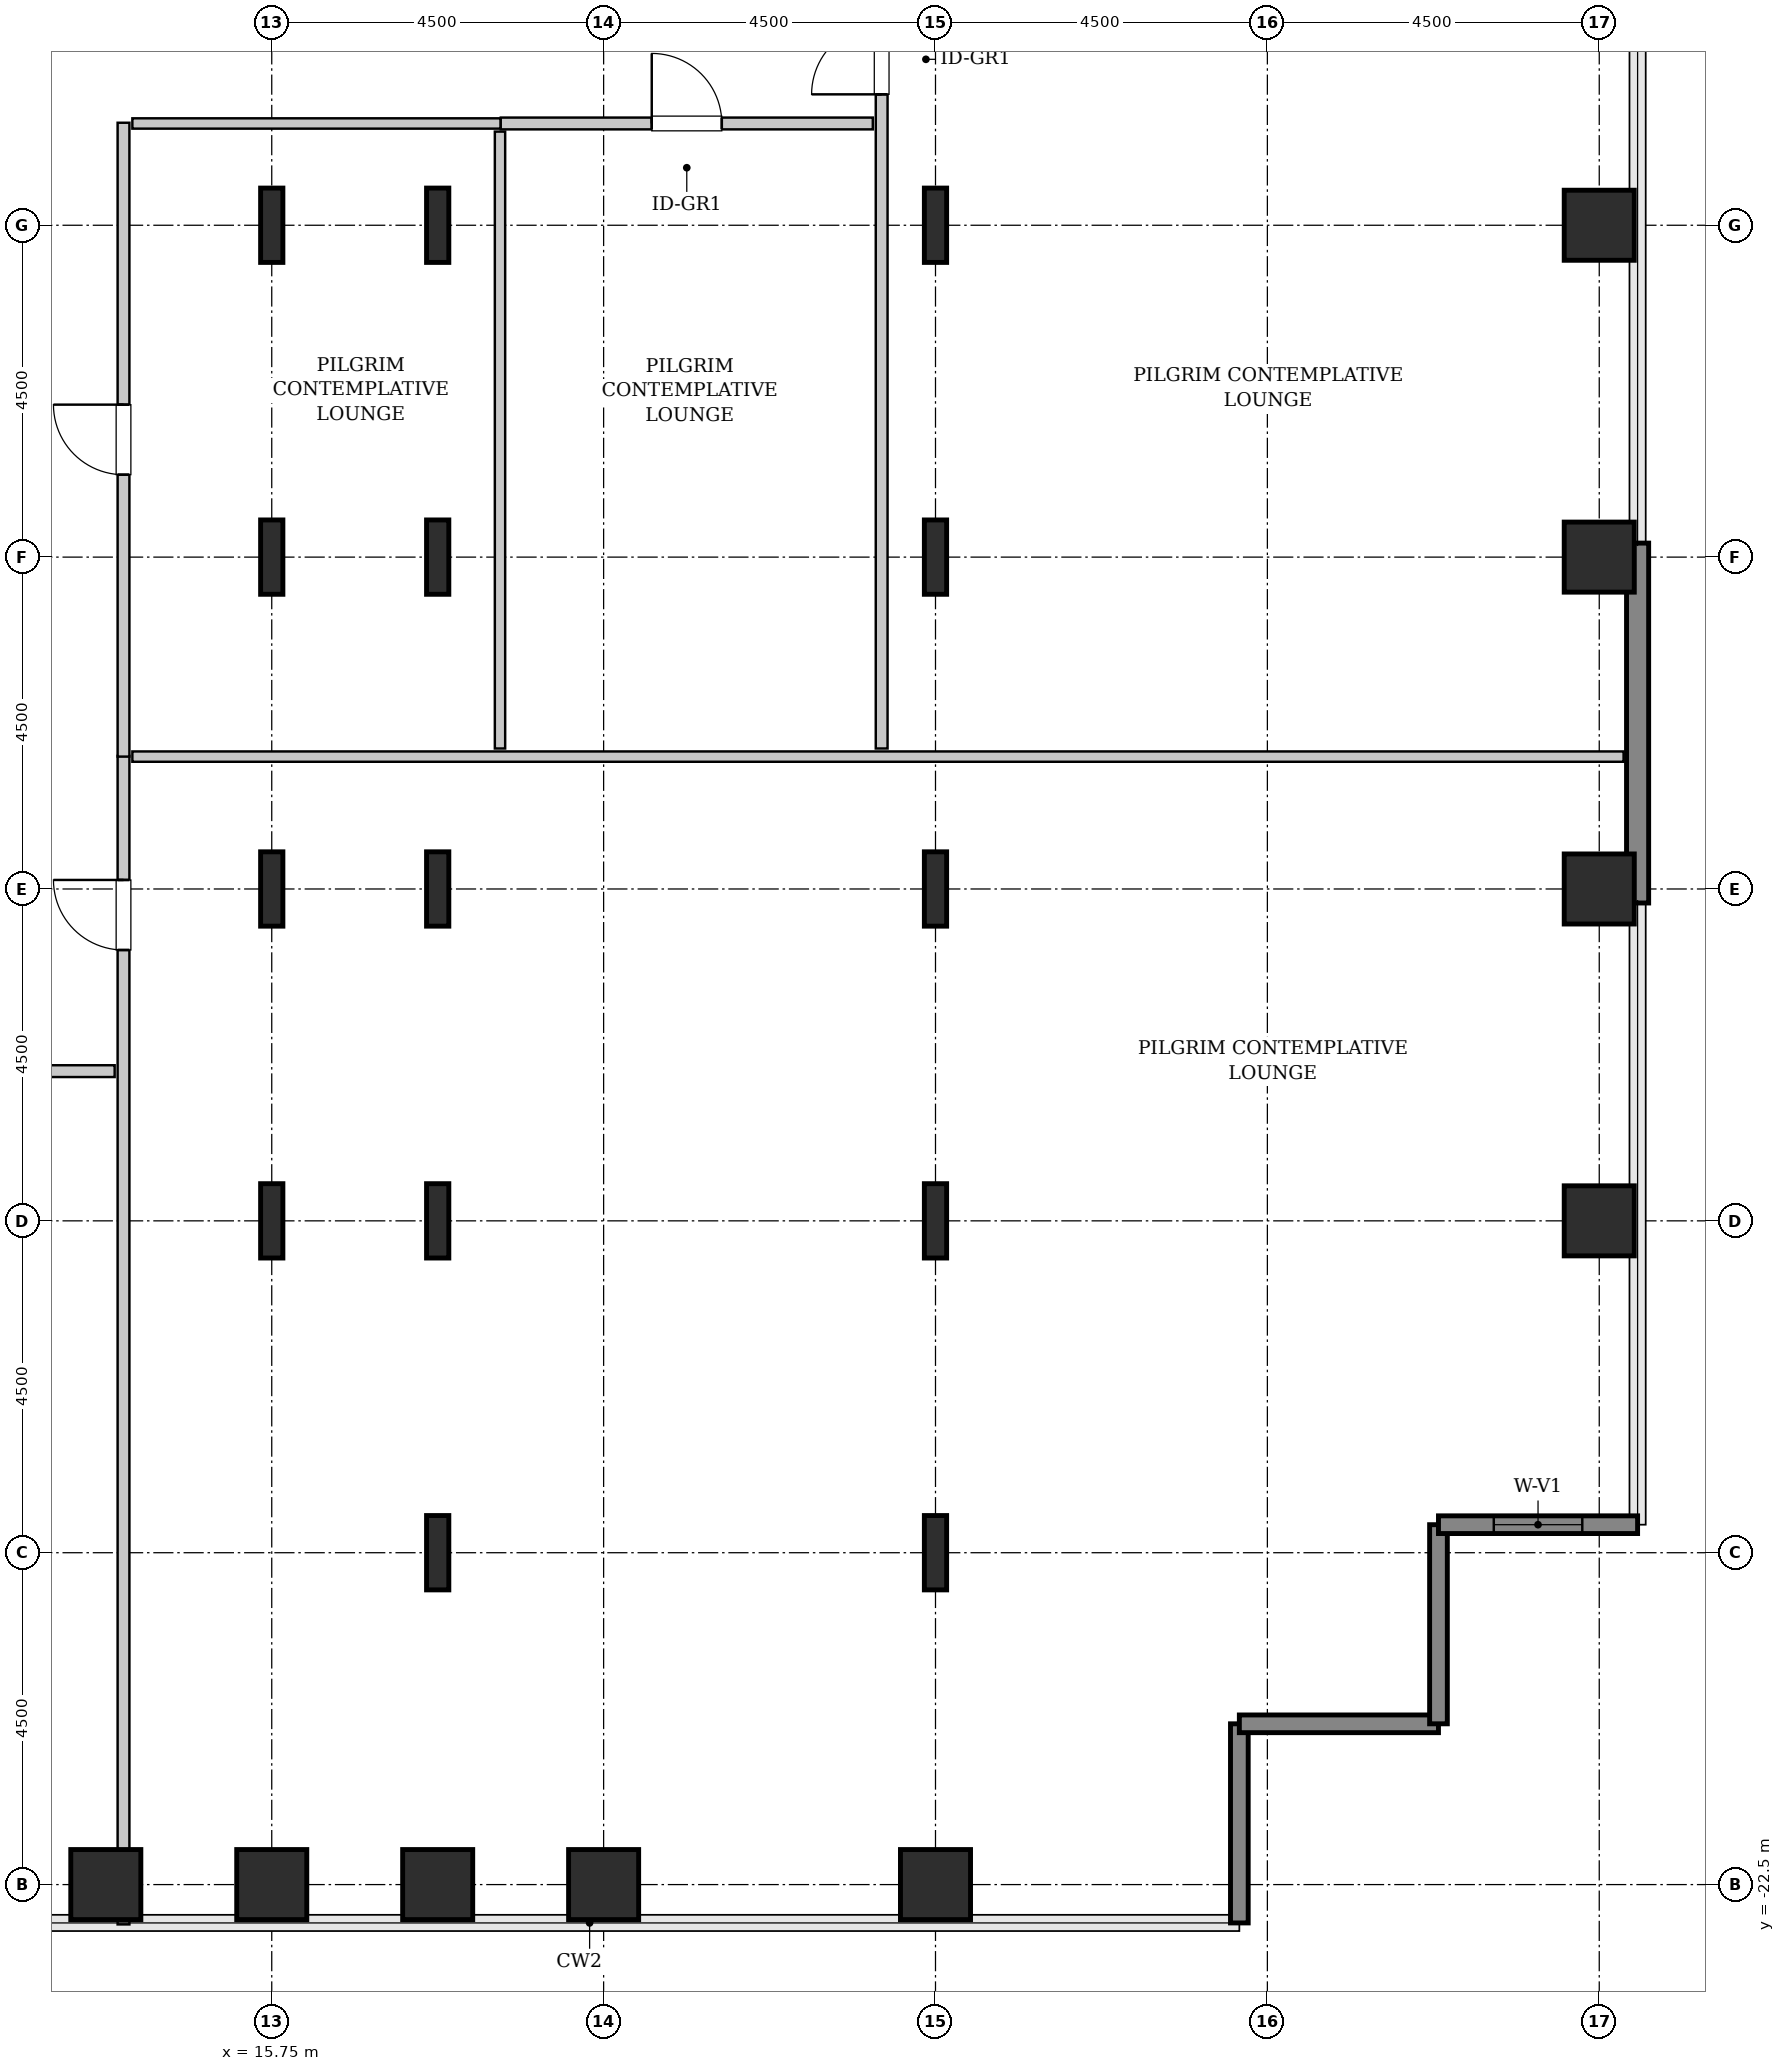
"""IFC4 building model, lengths in metres.
Left out: names, types, materials, properties, quantities, classifications, styles, units other than length and angle.
Written with IfcOpenShell. Run it as: python <this file> out.ifc"""

import sys

from ifc_helpers import new_model, si_unit, direction, frame, frame_2d, origin, origin_2d, place, context, subcontext, project, spatial, rectangle, hollow_rectangle, i_section, extrude, source, transform, mapped, element, fill, save


model = new_model("IFC4")
c1 = context("Model", 3, precision=1e-05, world=origin(), true_north=direction((0.0, 1.0)))
c2 = subcontext(c1, "Body", "Model", "MODEL_VIEW")
j1 = project(units=[si_unit("LENGTHUNIT", "METRE"), si_unit("PLANEANGLEUNIT", "RADIAN")], contexts=[c1])
p1 = place(None, origin())
s1 = spatial("IfcSite", under=j1, at=p1, CompositionType="ELEMENT")
p2 = place(p1, origin())
s2 = spatial("IfcBuilding", under=s1, at=p2, CompositionType="ELEMENT")
p3 = place(p2, frame((0.0, 0.0, 44.4)))
s3 = spatial("IfcBuildingStorey", under=s2, at=p3, CompositionType="ELEMENT", Elevation=44.4)
m1 = source(origin(), c2, "Body", "SweptSolid", [
    extrude(hollow_rectangle(XDim=0.95, YDim=0.95, WallThickness=0.045, InnerFilletRadius=0.045, OuterFilletRadius=0.09, at=origin_2d()), origin(), (0.0, 0.0, 1.0), 3.8),
])
for number, where, z_axis, x_axis in (
    (1, (13.5, -22.5, 0.0), (0.0, 0.0, 1.0), (1.0, 0.0, 0.0)),
    (2, (15.75, -22.5, 0.0), (0.0, 0.0, 1.0), (1.0, 0.0, 0.0)),
):
    element("IfcColumn", number, at=place(p3, frame(where, z_axis=z_axis, x_axis=x_axis)), inside=s3, PredefinedType="COLUMN", context=c2, shape_type="MappedRepresentation", body=[
        mapped(m1, transform((0.0, 0.0, 0.0), x_axis=(1.0, 0.0, 0.0), y_axis=(0.0, 1.0, 0.0), z_axis=(0.0, 0.0, 1.0), scale=1.0)),
    ])
m2 = source(origin(), c2, "Body", "SweptSolid", [
    extrude(i_section(OverallWidth=0.302, OverallDepth=1.008, WebThickness=0.021, FlangeThickness=0.04, FilletRadius=0.03, at=origin_2d()), origin(), (0.0, 0.0, 1.0), 3.8),
])
for number, where, z_axis, x_axis in (
    (3, (15.75, -13.5, 0.0), (0.0, 0.0, 1.0), (1.0, 0.0, 0.0)),
    (4, (15.75, -9.0, 0.0), (0.0, 0.0, 1.0), (1.0, 0.0, 0.0)),
    (5, (15.75, -4.5, 0.0), (0.0, 0.0, 1.0), (1.0, 0.0, 0.0)),
    (6, (15.75, 0.0, 0.0), (0.0, 0.0, 1.0), (1.0, 0.0, 0.0)),
):
    element("IfcColumn", number, at=place(p3, frame(where, z_axis=z_axis, x_axis=x_axis)), inside=s3, PredefinedType="COLUMN", context=c2, shape_type="MappedRepresentation", body=[
        mapped(m2, transform((0.0, 0.0, 0.0), x_axis=(1.0, 0.0, 0.0), y_axis=(0.0, 1.0, 0.0), z_axis=(0.0, 0.0, 1.0), scale=1.0)),
    ])
p4 = place(p3, frame((18.0, -22.5, 0.0), z_axis=(0.0, 0.0, 1.0), x_axis=(1.0, 0.0, 0.0)))
e7 = element("IfcColumn", 7, at=p4, inside=s3, PredefinedType="COLUMN", context=c2, shape_type="MappedRepresentation", body=[
    mapped(m1, transform((0.0, 0.0, 0.0), x_axis=(1.0, 0.0, 0.0), y_axis=(0.0, 1.0, 0.0), z_axis=(0.0, 0.0, 1.0), scale=1.0)),
])
for number, where, z_axis, x_axis in (
    (8, (18.0, -18.0, 0.0), (0.0, 0.0, 1.0), (1.0, 0.0, 0.0)),
    (9, (18.0, -13.5, 0.0), (0.0, 0.0, 1.0), (1.0, 0.0, 0.0)),
    (10, (18.0, -9.0, 0.0), (0.0, 0.0, 1.0), (1.0, 0.0, 0.0)),
    (11, (18.0, -4.5, 0.0), (0.0, 0.0, 1.0), (1.0, 0.0, 0.0)),
    (12, (18.0, 0.0, 0.0), (0.0, 0.0, 1.0), (1.0, 0.0, 0.0)),
):
    element("IfcColumn", number, at=place(p3, frame(where, z_axis=z_axis, x_axis=x_axis)), inside=s3, PredefinedType="COLUMN", context=c2, shape_type="MappedRepresentation", body=[
        mapped(m2, transform((0.0, 0.0, 0.0), x_axis=(1.0, 0.0, 0.0), y_axis=(0.0, 1.0, 0.0), z_axis=(0.0, 0.0, 1.0), scale=1.0)),
    ])
for number, where, z_axis, x_axis in (
    (13, (20.25, -22.5, 0.0), (0.0, 0.0, 1.0), (1.0, 0.0, 0.0)),
    (14, (24.75, -22.5, 0.0), (0.0, 0.0, 1.0), (1.0, 0.0, 0.0)),
):
    element("IfcColumn", number, at=place(p3, frame(where, z_axis=z_axis, x_axis=x_axis)), inside=s3, PredefinedType="COLUMN", context=c2, shape_type="MappedRepresentation", body=[
        mapped(m1, transform((0.0, 0.0, 0.0), x_axis=(1.0, 0.0, 0.0), y_axis=(0.0, 1.0, 0.0), z_axis=(0.0, 0.0, 1.0), scale=1.0)),
    ])
for number, where, z_axis, x_axis in (
    (15, (24.75, -18.0, 0.0), (0.0, 0.0, 1.0), (1.0, 0.0, 0.0)),
    (16, (24.75, -13.5, 0.0), (0.0, 0.0, 1.0), (1.0, 0.0, 0.0)),
    (17, (24.75, -9.0, 0.0), (0.0, 0.0, 1.0), (1.0, 0.0, 0.0)),
    (18, (24.75, -4.5, 0.0), (0.0, 0.0, 1.0), (1.0, 0.0, 0.0)),
    (19, (24.75, 0.0, 0.0), (0.0, 0.0, 1.0), (1.0, 0.0, 0.0)),
):
    element("IfcColumn", number, at=place(p3, frame(where, z_axis=z_axis, x_axis=x_axis)), inside=s3, PredefinedType="COLUMN", context=c2, shape_type="MappedRepresentation", body=[
        mapped(m2, transform((0.0, 0.0, 0.0), x_axis=(1.0, 0.0, 0.0), y_axis=(0.0, 1.0, 0.0), z_axis=(0.0, 0.0, 1.0), scale=1.0)),
    ])
for number, where, z_axis, x_axis in (
    (20, (33.75, -13.5, 0.0), (0.0, 0.0, 1.0), (1.0, 0.0, 0.0)),
    (21, (33.75, -9.0, 0.0), (0.0, 0.0, 1.0), (1.0, 0.0, 0.0)),
    (22, (33.75, -4.5, 0.0), (0.0, 0.0, 1.0), (1.0, 0.0, 0.0)),
    (23, (33.75, 0.0, 0.0), (0.0, 0.0, 1.0), (1.0, 0.0, 0.0)),
):
    element("IfcColumn", number, at=place(p3, frame(where, z_axis=z_axis, x_axis=x_axis)), inside=s3, PredefinedType="COLUMN", context=c2, shape_type="MappedRepresentation", body=[
        mapped(m1, transform((0.0, 0.0, 0.0), x_axis=(1.0, 0.0, 0.0), y_axis=(0.0, 1.0, 0.0), z_axis=(0.0, 0.0, 1.0), scale=1.0)),
    ])
m3 = source(origin(), c2, "Body", "SweptSolid", [
    extrude(rectangle(XDim=4.88, YDim=0.3, at=frame_2d((2.44, 0.0))), origin(), (0.0, 0.0, 1.0), 3.55),
])
p5 = place(p3, frame((34.27, -9.19, 0.0), z_axis=(0.0, 0.0, 1.0), x_axis=(0.0, 1.0, 0.0)))
e24 = element("IfcWall", 24, at=p5, inside=s3, PredefinedType="SHEAR", context=c2, shape_type="MappedRepresentation", body=[
    mapped(m3, transform((0.0, 0.0, 0.0), x_axis=(1.0, 0.0, 0.0), y_axis=(0.0, 1.0, 0.0), z_axis=(0.0, 0.0, 1.0), scale=1.0)),
])
m4 = source(origin(), c2, "Body", "SweptSolid", [
    extrude(rectangle(XDim=2.7, YDim=0.24, at=frame_2d((1.35, 0.0))), origin(), (0.0, 0.0, 1.0), 3.55),
])
for number, where, z_axis, x_axis in (
    (25, (28.87, -23.02, 0.0), (0.0, 0.0, 1.0), (0.0, 1.0, 0.0)),
    (26, (28.87, -20.32, 0.0), (0.0, 0.0, 1.0), (1.0, 0.0, 0.0)),
    (27, (31.57, -20.32, 0.0), (0.0, 0.0, 1.0), (0.0, 1.0, 0.0)),
):
    element("IfcWall", number, at=place(p3, frame(where, z_axis=z_axis, x_axis=x_axis)), inside=s3, PredefinedType="SHEAR", context=c2, shape_type="MappedRepresentation", body=[
        mapped(m4, transform((0.0, 0.0, 0.0), x_axis=(1.0, 0.0, 0.0), y_axis=(0.0, 1.0, 0.0), z_axis=(0.0, 0.0, 1.0), scale=1.0)),
    ])
p6 = place(p3, frame((31.57, -17.62, 0.0), z_axis=(0.0, 0.0, 1.0), x_axis=(1.0, 0.0, 0.0)))
e28 = element("IfcWall", 28, at=p6, inside=s3, PredefinedType="SHEAR", context=c2, shape_type="MappedRepresentation", body=[
    mapped(m4, transform((0.0, 0.0, 0.0), x_axis=(1.0, 0.0, 0.0), y_axis=(0.0, 1.0, 0.0), z_axis=(0.0, 0.0, 1.0), scale=1.0)),
])
p7 = place(p6, frame((0.75, 0.0, 0.85)))
e29 = element("IfcOpeningElement", 29, at=p7, cuts=e28, PredefinedType="OPENING", context=c2, shape_type="SweptSolid", body=[
    extrude(rectangle(XDim=1.2, YDim=1.8, at=frame_2d((0.6, 0.9))), frame((0.0, 0.13, 0.0), z_axis=(0.0, -1.0, 0.0), x_axis=(1.0, 0.0, 0.0)), (0.0, 0.0, 1.0), 0.26),
])
m5 = source(origin(), c2, "Body", "SweptSolid", [
    extrude(rectangle(XDim=15.845, YDim=0.16, at=frame_2d((7.922, 0.0))), origin(), (0.0, 0.0, 1.0), 3.535),
])
p8 = place(p3, frame((13.74, -23.04, 0.0), z_axis=(0.0, 0.0, 1.0), x_axis=(0.0, 1.0, 0.0)))
e30 = element("IfcWall", 30, at=p8, inside=s3, PredefinedType="PARTITIONING", context=c2, shape_type="MappedRepresentation", body=[
    mapped(m5, transform((0.0, 0.0, 0.0), x_axis=(1.0, 0.0, 0.0), y_axis=(0.0, 1.0, 0.0), z_axis=(0.0, 0.0, 1.0), scale=1.0)),
])
p9 = place(p8, frame((13.212, 0.0, 0.0)))
e31 = element("IfcOpeningElement", 31, at=p9, cuts=e30, PredefinedType="OPENING", context=c2, shape_type="SweptSolid", body=[
    extrude(rectangle(XDim=0.95, YDim=2.1, at=frame_2d((0.475, 1.05))), frame((0.0, 0.09, 0.0), z_axis=(0.0, -1.0, 0.0), x_axis=(1.0, 0.0, 0.0)), (0.0, 0.0, 1.0), 0.18),
])
m6 = source(origin(), c2, "Body", "SweptSolid", [
    extrude(rectangle(XDim=20.22, YDim=0.14, at=frame_2d((10.11, 0.0))), origin(), (0.0, 0.0, 1.0), 3.535),
])
p10 = place(p3, frame((13.86, -7.205, 0.0), z_axis=(0.0, 0.0, 1.0), x_axis=(1.0, 0.0, 0.0)))
e32 = element("IfcWall", 32, at=p10, inside=s3, PredefinedType="PARTITIONING", context=c2, shape_type="MappedRepresentation", body=[
    mapped(m6, transform((0.0, 0.0, 0.0), x_axis=(1.0, 0.0, 0.0), y_axis=(0.0, 1.0, 0.0), z_axis=(0.0, 0.0, 1.0), scale=1.0)),
])
m7 = source(origin(), c2, "Body", "SweptSolid", [
    extrude(rectangle(XDim=13.3, YDim=0.16, at=frame_2d((6.65, 0.0))), origin(), (0.0, 0.0, 1.0), 3.535),
])
p11 = place(p3, frame((24.02, -7.095, 0.0), z_axis=(0.0, 0.0, 1.0), x_axis=(0.0, 1.0, 0.0)))
e33 = element("IfcWall", 33, at=p11, inside=s3, PredefinedType="PARTITIONING", context=c2, shape_type="MappedRepresentation", body=[
    mapped(m7, transform((0.0, 0.0, 0.0), x_axis=(1.0, 0.0, 0.0), y_axis=(0.0, 1.0, 0.0), z_axis=(0.0, 0.0, 1.0), scale=1.0)),
])
p12 = place(p11, frame((8.87, 0.0, 0.0)))
e34 = element("IfcOpeningElement", 34, at=p12, cuts=e33, PredefinedType="OPENING", context=c2, shape_type="SweptSolid", body=[
    extrude(rectangle(XDim=0.95, YDim=2.1, at=frame_2d((0.475, 1.05))), frame((0.0, 0.09, 0.0), z_axis=(0.0, -1.0, 0.0), x_axis=(1.0, 0.0, 0.0)), (0.0, 0.0, 1.0), 0.18),
])
m8 = source(origin(), c2, "Body", "SweptSolid", [
    extrude(rectangle(XDim=8.595, YDim=0.16, at=frame_2d((4.297, 0.0))), origin(), (0.0, 0.0, 1.0), 3.535),
])
p13 = place(p3, frame((13.74, -7.205, 0.0), z_axis=(0.0, 0.0, 1.0), x_axis=(0.0, 1.0, 0.0)))
e35 = element("IfcWall", 35, at=p13, inside=s3, PredefinedType="PARTITIONING", context=c2, shape_type="MappedRepresentation", body=[
    mapped(m8, transform((0.0, 0.0, 0.0), x_axis=(1.0, 0.0, 0.0), y_axis=(0.0, 1.0, 0.0), z_axis=(0.0, 0.0, 1.0), scale=1.0)),
])
p14 = place(p13, frame((3.823, 0.0, 0.0)))
e36 = element("IfcOpeningElement", 36, at=p14, cuts=e35, PredefinedType="OPENING", context=c2, shape_type="SweptSolid", body=[
    extrude(rectangle(XDim=0.95, YDim=2.1, at=frame_2d((0.475, 1.05))), frame((0.0, 0.09, 0.0), z_axis=(0.0, -1.0, 0.0), x_axis=(1.0, 0.0, 0.0)), (0.0, 0.0, 1.0), 0.18),
])
m9 = source(origin(), c2, "Body", "SweptSolid", [
    extrude(rectangle(XDim=4.995, YDim=0.14, at=frame_2d((2.498, 0.0))), origin(), (0.0, 0.0, 1.0), 3.535),
])
p15 = place(p3, frame((13.86, 1.38, 0.0), z_axis=(0.0, 0.0, 1.0), x_axis=(1.0, 0.0, 0.0)))
e37 = element("IfcWall", 37, at=p15, inside=s3, PredefinedType="PARTITIONING", context=c2, shape_type="MappedRepresentation", body=[
    mapped(m9, transform((0.0, 0.0, 0.0), x_axis=(1.0, 0.0, 0.0), y_axis=(0.0, 1.0, 0.0), z_axis=(0.0, 0.0, 1.0), scale=1.0)),
])
m10 = source(origin(), c2, "Body", "SweptSolid", [
    extrude(rectangle(XDim=8.365, YDim=0.14, at=frame_2d((4.183, 0.0))), origin(), (0.0, 0.0, 1.0), 3.535),
])
p16 = place(p3, frame((18.845, -7.095, 0.0), z_axis=(0.0, 0.0, 1.0), x_axis=(0.0, 1.0, 0.0)))
e38 = element("IfcWall", 38, at=p16, inside=s3, PredefinedType="PARTITIONING", context=c2, shape_type="MappedRepresentation", body=[
    mapped(m10, transform((0.0, 0.0, 0.0), x_axis=(1.0, 0.0, 0.0), y_axis=(0.0, 1.0, 0.0), z_axis=(0.0, 0.0, 1.0), scale=1.0)),
])
m11 = source(origin(), c2, "Body", "SweptSolid", [
    extrude(rectangle(XDim=5.045, YDim=0.16, at=frame_2d((2.522, 0.0))), origin(), (0.0, 0.0, 1.0), 3.535),
])
p17 = place(p3, frame((18.855, 1.38, 0.0), z_axis=(0.0, 0.0, 1.0), x_axis=(1.0, 0.0, 0.0)))
e39 = element("IfcWall", 39, at=p17, inside=s3, PredefinedType="PARTITIONING", context=c2, shape_type="MappedRepresentation", body=[
    mapped(m11, transform((0.0, 0.0, 0.0), x_axis=(1.0, 0.0, 0.0), y_axis=(0.0, 1.0, 0.0), z_axis=(0.0, 0.0, 1.0), scale=1.0)),
])
p18 = place(p17, frame((2.048, 0.0, 0.0)))
e40 = element("IfcOpeningElement", 40, at=p18, cuts=e39, PredefinedType="OPENING", context=c2, shape_type="SweptSolid", body=[
    extrude(rectangle(XDim=0.95, YDim=2.1, at=frame_2d((0.475, 1.05))), frame((0.0, 0.09, 0.0), z_axis=(0.0, -1.0, 0.0), x_axis=(1.0, 0.0, 0.0)), (0.0, 0.0, 1.0), 0.18),
])
m12 = source(origin(), c2, "Body", "SweptSolid", [
    extrude(rectangle(XDim=6.025, YDim=0.16, at=frame_2d((3.013, 0.0))), origin(), (0.0, 0.0, 1.0), 3.535),
])
p19 = place(p3, frame((7.595, -11.47, 0.0), z_axis=(0.0, 0.0, 1.0), x_axis=(1.0, 0.0, 0.0)))
e41 = element("IfcWall", 41, at=p19, inside=s3, PredefinedType="PARTITIONING", context=c2, shape_type="MappedRepresentation", body=[
    mapped(m12, transform((0.0, 0.0, 0.0), x_axis=(1.0, 0.0, 0.0), y_axis=(0.0, 1.0, 0.0), z_axis=(0.0, 0.0, 1.0), scale=1.0)),
])
p20 = place(p19, frame((2.538, 0.0, 0.0)))
e42 = element("IfcOpeningElement", 42, at=p20, cuts=e41, PredefinedType="OPENING", context=c2, shape_type="SweptSolid", body=[
    extrude(rectangle(XDim=0.95, YDim=2.1, at=frame_2d((0.475, 1.05))), frame((0.0, 0.09, 0.0), z_axis=(0.0, -1.0, 0.0), x_axis=(1.0, 0.0, 0.0)), (0.0, 0.0, 1.0), 0.18),
])
m13 = source(origin(), c2, "Body", "SweptSolid", [
    extrude(rectangle(XDim=1.2, YDim=1.8, at=frame_2d((0.6, 0.9))), frame((0.0, 0.03, 0.0), z_axis=(0.0, -1.0, 0.0), x_axis=(1.0, 0.0, 0.0)), (0.0, 0.0, 1.0), 0.06),
])
p21 = place(p7, origin())
e43 = element("IfcWindow", 43, at=p21, inside=s3, PartitioningType="SINGLE_PANEL", PredefinedType="WINDOW", context=c2, shape_type="MappedRepresentation", body=[
    mapped(m13, transform((0.0, 0.0, 0.0), x_axis=(1.0, 0.0, 0.0), y_axis=(0.0, 1.0, 0.0), z_axis=(0.0, 0.0, 1.0), scale=1.0)),
])
fill(e29, e43)
m14 = source(origin(), c2, "Body", "SweptSolid", [
    extrude(rectangle(XDim=0.95, YDim=2.1, at=frame_2d((0.475, 1.05))), frame((0.0, 0.025, 0.0), z_axis=(0.0, -1.0, 0.0), x_axis=(1.0, 0.0, 0.0)), (0.0, 0.0, 1.0), 0.05),
])
p22 = place(p9, origin())
e44 = element("IfcDoor", 44, at=p22, inside=s3, OperationType="SINGLE_SWING_RIGHT", PredefinedType="DOOR", context=c2, shape_type="MappedRepresentation", body=[
    mapped(m14, transform((0.0, 0.0, 0.0), x_axis=(1.0, 0.0, 0.0), y_axis=(0.0, 1.0, 0.0), z_axis=(0.0, 0.0, 1.0), scale=1.0)),
])
fill(e31, e44)
p23 = place(p12, origin())
e45 = element("IfcDoor", 45, at=p23, inside=s3, OperationType="SINGLE_SWING_LEFT", PredefinedType="DOOR", context=c2, shape_type="MappedRepresentation", body=[
    mapped(m14, transform((0.0, 0.0, 0.0), x_axis=(1.0, 0.0, 0.0), y_axis=(0.0, 1.0, 0.0), z_axis=(0.0, 0.0, 1.0), scale=1.0)),
])
fill(e34, e45)
p24 = place(p14, origin())
e46 = element("IfcDoor", 46, at=p24, inside=s3, OperationType="SINGLE_SWING_RIGHT", PredefinedType="DOOR", context=c2, shape_type="MappedRepresentation", body=[
    mapped(m14, transform((0.0, 0.0, 0.0), x_axis=(1.0, 0.0, 0.0), y_axis=(0.0, 1.0, 0.0), z_axis=(0.0, 0.0, 1.0), scale=1.0)),
])
fill(e36, e46)
p25 = place(p18, origin())
e47 = element("IfcDoor", 47, at=p25, inside=s3, OperationType="SINGLE_SWING_LEFT", PredefinedType="DOOR", context=c2, shape_type="MappedRepresentation", body=[
    mapped(m14, transform((0.0, 0.0, 0.0), x_axis=(1.0, 0.0, 0.0), y_axis=(0.0, 1.0, 0.0), z_axis=(0.0, 0.0, 1.0), scale=1.0)),
])
fill(e40, e47)
save(model, sys.argv[1])
